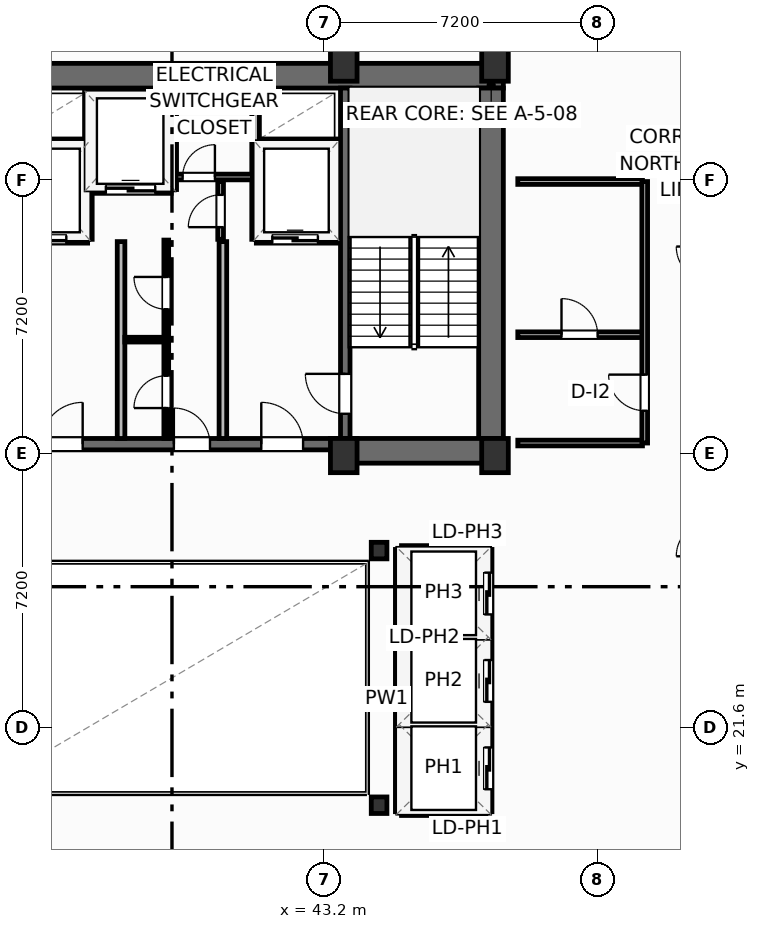
"""IFC4 building model, lengths in metres.
Left out: names, types, materials, properties, quantities, classifications, styles, units other than length and angle.
Written with IfcOpenShell. Run it as: python <this file> out.ifc"""

import sys

from ifc_helpers import new_model, si_unit, direction, frame, frame_2d, origin, origin_2d, place, context, subcontext, project, spatial, rectangle, i_section, extrude, element, fill, save


model = new_model("IFC4")
c1 = context("Model", 3, precision=1e-05, world=origin(), true_north=direction((0.0, 1.0)))
c2 = subcontext(c1, "Body", "Model", "MODEL_VIEW")
j1 = project(units=[si_unit("LENGTHUNIT", "METRE"), si_unit("PLANEANGLEUNIT", "RADIAN")], contexts=[c1])
p1 = place(None, origin())
s1 = spatial("IfcSite", under=j1, at=p1, CompositionType="ELEMENT")
p2 = place(p1, origin())
s2 = spatial("IfcBuilding", under=s1, at=p2, CompositionType="ELEMENT")
p3 = place(p2, frame((0.0, 0.0, 223.8)))
s3 = spatial("IfcBuildingStorey", under=s2, at=p3, CompositionType="ELEMENT", Elevation=223.8)
for number, where, z_axis, x_axis in (
    (1, (43.72, 28.75, 0.0), (0.0, 0.0, 1.0), (1.0, 0.0, 0.0)),
    (2, (47.7, 28.75, 0.0), (0.0, 0.0, 1.0), (1.0, 0.0, 0.0)),
    (3, (43.72, 39.05, 0.0), (0.0, 0.0, 1.0), (1.0, 0.0, 0.0)),
    (4, (47.7, 39.05, 0.0), (0.0, 0.0, 1.0), (1.0, 0.0, 0.0)),
):
    element("IfcColumn", number, at=place(p3, frame(where, z_axis=z_axis, x_axis=x_axis)), inside=s3, PredefinedType="COLUMN", context=c2, shape_type="SweptSolid", body=[
        extrude(rectangle(XDim=0.7, YDim=0.9, at=origin_2d()), origin(), (0.0, 0.0, 1.0), 3.7),
    ])
for number, where, z_axis, x_axis in (
    (5, (44.65, 19.55, 0.0), (0.0, 0.0, 1.0), (1.0, 0.0, 0.0)),
    (6, (44.65, 26.25, 0.0), (0.0, 0.0, 1.0), (1.0, 0.0, 0.0)),
):
    element("IfcColumn", number, at=place(p3, frame(where, z_axis=z_axis, x_axis=x_axis)), inside=s3, PredefinedType="COLUMN", context=c2, shape_type="SweptSolid", body=[
        extrude(i_section(OverallWidth=0.412, OverallDepth=0.435, WebThickness=0.036, FlangeThickness=0.057, FilletRadius=0.025, at=origin_2d()), origin(), (0.0, 0.0, 1.0), 3.7),
    ])
p4 = place(p3, frame((30.48, 38.745, 0.0), z_axis=(0.0, 0.0, 1.0), x_axis=(1.0, 0.0, 0.0)))
e7 = element("IfcWall", 7, at=p4, inside=s3, PredefinedType="SHEAR", context=c2, shape_type="SweptSolid", body=[
    extrude(rectangle(XDim=17.44, YDim=0.65, at=frame_2d((8.72, 0.0))), origin(), (0.0, 0.0, 1.0), 3.45),
])
p5 = place(p3, frame((47.595, 29.2, 0.0), z_axis=(0.0, 0.0, 1.0), x_axis=(0.0, 1.0, 0.0)))
e8 = element("IfcWall", 8, at=p5, inside=s3, PredefinedType="SHEAR", context=c2, shape_type="SweptSolid", body=[
    extrude(rectangle(XDim=9.22, YDim=0.65, at=frame_2d((4.61, 0.0))), origin(), (0.0, 0.0, 1.0), 3.45),
])
p6 = place(p3, frame((43.6, 28.875, 0.0), z_axis=(0.0, 0.0, 1.0), x_axis=(1.0, 0.0, 0.0)))
e9 = element("IfcWall", 9, at=p6, inside=s3, PredefinedType="SHEAR", context=c2, shape_type="SweptSolid", body=[
    extrude(rectangle(XDim=4.32, YDim=0.65, at=frame_2d((2.16, 0.0))), origin(), (0.0, 0.0, 1.0), 3.45),
])
p7 = place(p3, frame((34.8, 29.05, 0.0), z_axis=(0.0, 0.0, 1.0), x_axis=(1.0, 0.0, 0.0)))
e10 = element("IfcWall", 10, at=p7, inside=s3, PredefinedType="SHEAR", context=c2, shape_type="SweptSolid", body=[
    extrude(rectangle(XDim=8.8, YDim=0.3, at=frame_2d((4.4, 0.0))), origin(), (0.0, 0.0, 1.0), 3.45),
])
p8 = place(p7, frame((0.95, 0.0, 0.0)))
e11 = element("IfcOpeningElement", 11, at=p8, cuts=e10, PredefinedType="OPENING", context=c2, shape_type="SweptSolid", body=[
    extrude(rectangle(XDim=1.1, YDim=2.15, at=frame_2d((0.55, 1.075))), frame((0.0, 0.16, 0.0), z_axis=(0.0, -1.0, 0.0), x_axis=(1.0, 0.0, 0.0)), (0.0, 0.0, 1.0), 0.32),
])
p9 = place(p7, frame((6.75, 0.0, 0.0)))
e12 = element("IfcOpeningElement", 12, at=p9, cuts=e10, PredefinedType="OPENING", context=c2, shape_type="SweptSolid", body=[
    extrude(rectangle(XDim=1.1, YDim=2.15, at=frame_2d((0.55, 1.075))), frame((0.0, 0.16, 0.0), z_axis=(0.0, -1.0, 0.0), x_axis=(1.0, 0.0, 0.0)), (0.0, 0.0, 1.0), 0.32),
])
p10 = place(p7, frame((4.45, 0.0, 0.0)))
e13 = element("IfcOpeningElement", 13, at=p10, cuts=e10, PredefinedType="OPENING", context=c2, shape_type="SweptSolid", body=[
    extrude(rectangle(XDim=0.95, YDim=2.15, at=frame_2d((0.475, 1.075))), frame((0.0, 0.16, 0.0), z_axis=(0.0, -1.0, 0.0), x_axis=(1.0, 0.0, 0.0)), (0.0, 0.0, 1.0), 0.32),
])
p11 = place(p3, frame((43.76, 29.2, 0.0), z_axis=(0.0, 0.0, 1.0), x_axis=(0.0, 1.0, 0.0)))
e14 = element("IfcWall", 14, at=p11, inside=s3, PredefinedType="SHEAR", context=c2, shape_type="SweptSolid", body=[
    extrude(rectangle(XDim=9.22, YDim=0.25, at=frame_2d((4.61, 0.0))), origin(), (0.0, 0.0, 1.0), 3.45),
])
p12 = place(p11, frame((0.65, 0.0, 0.0)))
e15 = element("IfcOpeningElement", 15, at=p12, cuts=e14, PredefinedType="OPENING", context=c2, shape_type="SweptSolid", body=[
    extrude(rectangle(XDim=1.05, YDim=2.15, at=frame_2d((0.525, 1.075))), frame((0.0, 0.135, 0.0), z_axis=(0.0, -1.0, 0.0), x_axis=(1.0, 0.0, 0.0)), (0.0, 0.0, 1.0), 0.27),
])
for number, where, z_axis, x_axis in (
    (16, (37.86, 29.2, 0.0), (0.0, 0.0, 1.0), (0.0, 1.0, 0.0)),
    (17, (40.54, 29.2, 0.0), (0.0, 0.0, 1.0), (0.0, 1.0, 0.0)),
):
    element("IfcWall", number, at=place(p3, frame(where, z_axis=z_axis, x_axis=x_axis)), inside=s3, PredefinedType="PARTITIONING", context=c2, shape_type="SweptSolid", body=[
        extrude(rectangle(XDim=5.18, YDim=0.2, at=frame_2d((2.59, 0.0))), origin(), (0.0, 0.0, 1.0), 3.45),
    ])
p13 = place(p3, frame((34.8, 34.44, 0.0), z_axis=(0.0, 0.0, 1.0), x_axis=(1.0, 0.0, 0.0)))
e18 = element("IfcWall", 18, at=p13, inside=s3, PredefinedType="PARTITIONING", context=c2, shape_type="SweptSolid", body=[
    extrude(rectangle(XDim=2.18, YDim=0.2, at=frame_2d((1.09, 0.0))), origin(), (0.0, 0.0, 1.0), 3.45),
])
p14 = place(p13, frame((0.42, 0.0, 0.0)))
e19 = element("IfcOpeningElement", 19, at=p14, cuts=e18, PredefinedType="OPENING", context=c2, shape_type="SweptSolid", body=[
    extrude(rectangle(XDim=1.2, YDim=2.2, at=frame_2d((0.6, 1.1))), frame((0.0, 0.11, 0.0), z_axis=(0.0, -1.0, 0.0), x_axis=(1.0, 0.0, 0.0)), (0.0, 0.0, 1.0), 0.22),
])
p15 = place(p3, frame((34.8, 36.98, 0.0), z_axis=(0.0, 0.0, 1.0), x_axis=(1.0, 0.0, 0.0)))
e20 = element("IfcWall", 20, at=p15, inside=s3, PredefinedType="PARTITIONING", context=c2, shape_type="SweptSolid", body=[
    extrude(rectangle(XDim=2.18, YDim=0.2, at=frame_2d((1.09, 0.0))), origin(), (0.0, 0.0, 1.0), 3.45),
])
p16 = place(p3, frame((37.0, 34.44, 0.0), z_axis=(0.0, 0.0, 1.0), x_axis=(0.0, 1.0, 0.0)))
e21 = element("IfcWall", 21, at=p16, inside=s3, PredefinedType="PARTITIONING", context=c2, shape_type="SweptSolid", body=[
    extrude(rectangle(XDim=3.9, YDim=0.2, at=frame_2d((1.95, 0.0))), origin(), (0.0, 0.0, 1.0), 3.45),
])
p17 = place(p3, frame((41.42, 34.44, 0.0), z_axis=(0.0, 0.0, 1.0), x_axis=(1.0, 0.0, 0.0)))
e22 = element("IfcWall", 22, at=p17, inside=s3, PredefinedType="PARTITIONING", context=c2, shape_type="SweptSolid", body=[
    extrude(rectangle(XDim=2.18, YDim=0.2, at=frame_2d((1.09, 0.0))), origin(), (0.0, 0.0, 1.0), 3.45),
])
p18 = place(p17, frame((0.42, 0.0, 0.0)))
e23 = element("IfcOpeningElement", 23, at=p18, cuts=e22, PredefinedType="OPENING", context=c2, shape_type="SweptSolid", body=[
    extrude(rectangle(XDim=1.2, YDim=2.2, at=frame_2d((0.6, 1.1))), frame((0.0, 0.11, 0.0), z_axis=(0.0, -1.0, 0.0), x_axis=(1.0, 0.0, 0.0)), (0.0, 0.0, 1.0), 0.22),
])
p19 = place(p3, frame((41.42, 36.98, 0.0), z_axis=(0.0, 0.0, 1.0), x_axis=(1.0, 0.0, 0.0)))
e24 = element("IfcWall", 24, at=p19, inside=s3, PredefinedType="PARTITIONING", context=c2, shape_type="SweptSolid", body=[
    extrude(rectangle(XDim=2.18, YDim=0.2, at=frame_2d((1.09, 0.0))), origin(), (0.0, 0.0, 1.0), 3.45),
])
p20 = place(p3, frame((41.4, 34.44, 0.0), z_axis=(0.0, 0.0, 1.0), x_axis=(0.0, 1.0, 0.0)))
e25 = element("IfcWall", 25, at=p20, inside=s3, PredefinedType="PARTITIONING", context=c2, shape_type="SweptSolid", body=[
    extrude(rectangle(XDim=3.9, YDim=0.2, at=frame_2d((1.95, 0.0))), origin(), (0.0, 0.0, 1.0), 3.45),
])
p21 = place(p3, frame((37.06, 35.75, 0.0), z_axis=(0.0, 0.0, 1.0), x_axis=(1.0, 0.0, 0.0)))
e26 = element("IfcWall", 26, at=p21, inside=s3, PredefinedType="PARTITIONING", context=c2, shape_type="SweptSolid", body=[
    extrude(rectangle(XDim=2.12, YDim=0.2, at=frame_2d((1.06, 0.0))), origin(), (0.0, 0.0, 1.0), 3.45),
])
p22 = place(p21, frame((0.4, 0.0, 0.0)))
e27 = element("IfcOpeningElement", 27, at=p22, cuts=e26, PredefinedType="OPENING", context=c2, shape_type="SweptSolid", body=[
    extrude(rectangle(XDim=1.3, YDim=2.2, at=frame_2d((0.65, 1.1))), frame((0.0, 0.11, 0.0), z_axis=(0.0, -1.0, 0.0), x_axis=(1.0, 0.0, 0.0)), (0.0, 0.0, 1.0), 0.22),
])
p23 = place(p3, frame((39.22, 35.75, 0.0), z_axis=(0.0, 0.0, 1.0), x_axis=(0.0, 1.0, 0.0)))
e28 = element("IfcWall", 28, at=p23, inside=s3, PredefinedType="PARTITIONING", context=c2, shape_type="SweptSolid", body=[
    extrude(rectangle(XDim=2.59, YDim=0.2, at=frame_2d((1.295, 0.0))), origin(), (0.0, 0.0, 1.0), 3.45),
])
p24 = place(p3, frame((39.3, 36.08, 0.0), z_axis=(0.0, 0.0, 1.0), x_axis=(1.0, 0.0, 0.0)))
e29 = element("IfcWall", 29, at=p24, inside=s3, PredefinedType="PARTITIONING", context=c2, shape_type="SweptSolid", body=[
    extrude(rectangle(XDim=2.02, YDim=0.15, at=frame_2d((1.01, 0.0))), origin(), (0.0, 0.0, 1.0), 3.45),
])
p25 = place(p24, frame((0.18, 0.0, 0.0)))
e30 = element("IfcOpeningElement", 30, at=p25, cuts=e29, PredefinedType="OPENING", context=c2, shape_type="SweptSolid", body=[
    extrude(rectangle(XDim=0.85, YDim=2.05, at=frame_2d((0.425, 1.025))), frame((0.0, 0.085, 0.0), z_axis=(0.0, -1.0, 0.0), x_axis=(1.0, 0.0, 0.0)), (0.0, 0.0, 1.0), 0.17),
])
p26 = place(p3, frame((40.48, 34.44, 0.0), z_axis=(0.0, 0.0, 1.0), x_axis=(0.0, 1.0, 0.0)))
e31 = element("IfcWall", 31, at=p26, inside=s3, PredefinedType="PARTITIONING", context=c2, shape_type="SweptSolid", body=[
    extrude(rectangle(XDim=1.52, YDim=0.15, at=frame_2d((0.76, 0.0))), origin(), (0.0, 0.0, 1.0), 3.45),
])
p27 = place(p26, frame((0.32, 0.0, 0.0)))
e32 = element("IfcOpeningElement", 32, at=p27, cuts=e31, PredefinedType="OPENING", context=c2, shape_type="SweptSolid", body=[
    extrude(rectangle(XDim=0.85, YDim=2.05, at=frame_2d((0.425, 1.025))), frame((0.0, 0.085, 0.0), z_axis=(0.0, -1.0, 0.0), x_axis=(1.0, 0.0, 0.0)), (0.0, 0.0, 1.0), 0.17),
])
p28 = place(p3, frame((37.96, 31.8, 0.0), z_axis=(0.0, 0.0, 1.0), x_axis=(1.0, 0.0, 0.0)))
e33 = element("IfcWall", 33, at=p28, inside=s3, PredefinedType="PARTITIONING", context=c2, shape_type="SweptSolid", body=[
    extrude(rectangle(XDim=1.09, YDim=0.125, at=frame_2d((0.545, 0.0))), origin(), (0.0, 0.0, 1.0), 3.45),
])
p29 = place(p3, frame((39.05, 29.2, 0.0), z_axis=(0.0, 0.0, 1.0), x_axis=(0.0, 1.0, 0.0)))
e34 = element("IfcWall", 34, at=p29, inside=s3, PredefinedType="PARTITIONING", context=c2, shape_type="SweptSolid", body=[
    extrude(rectangle(XDim=5.22, YDim=0.125, at=frame_2d((2.61, 0.0))), origin(), (0.0, 0.0, 1.0), 3.45),
])
p30 = place(p29, frame((0.8, 0.0, 0.0)))
e35 = element("IfcOpeningElement", 35, at=p30, cuts=e34, PredefinedType="OPENING", context=c2, shape_type="SweptSolid", body=[
    extrude(rectangle(XDim=0.85, YDim=2.05, at=frame_2d((0.425, 1.025))), frame((0.0, 0.073, 0.0), z_axis=(0.0, -1.0, 0.0), x_axis=(1.0, 0.0, 0.0)), (0.0, 0.0, 1.0), 0.145),
])
p31 = place(p29, frame((3.4, 0.0, 0.0)))
e36 = element("IfcOpeningElement", 36, at=p31, cuts=e34, PredefinedType="OPENING", context=c2, shape_type="SweptSolid", body=[
    extrude(rectangle(XDim=0.85, YDim=2.05, at=frame_2d((0.425, 1.025))), frame((0.0, 0.073, 0.0), z_axis=(0.0, -1.0, 0.0), x_axis=(1.0, 0.0, 0.0)), (0.0, 0.0, 1.0), 0.145),
])
p32 = place(p3, frame((48.3, 31.93, 0.0), z_axis=(0.0, 0.0, 1.0), x_axis=(1.0, 0.0, 0.0)))
e37 = element("IfcWall", 37, at=p32, inside=s3, PredefinedType="PARTITIONING", context=c2, shape_type="SweptSolid", body=[
    extrude(rectangle(XDim=3.28, YDim=0.15, at=frame_2d((1.64, 0.0))), origin(), (0.0, 0.0, 1.0), 3.45),
])
p33 = place(p32, frame((1.15, 0.0, 0.0)))
e38 = element("IfcOpeningElement", 38, at=p33, cuts=e37, PredefinedType="OPENING", context=c2, shape_type="SweptSolid", body=[
    extrude(rectangle(XDim=0.95, YDim=2.05, at=frame_2d((0.475, 1.025))), frame((0.0, 0.085, 0.0), z_axis=(0.0, -1.0, 0.0), x_axis=(1.0, 0.0, 0.0)), (0.0, 0.0, 1.0), 0.17),
])
p34 = place(p3, frame((48.3, 29.08, 0.0), z_axis=(0.0, 0.0, 1.0), x_axis=(1.0, 0.0, 0.0)))
e39 = element("IfcWall", 39, at=p34, inside=s3, PredefinedType="PARTITIONING", context=c2, shape_type="SweptSolid", body=[
    extrude(rectangle(XDim=3.28, YDim=0.15, at=frame_2d((1.64, 0.0))), origin(), (0.0, 0.0, 1.0), 2.662),
])
p35 = place(p3, frame((48.3, 35.96, 0.0), z_axis=(0.0, 0.0, 1.0), x_axis=(1.0, 0.0, 0.0)))
e40 = element("IfcWall", 40, at=p35, inside=s3, PredefinedType="PARTITIONING", context=c2, shape_type="SweptSolid", body=[
    extrude(rectangle(XDim=3.28, YDim=0.15, at=frame_2d((1.64, 0.0))), origin(), (0.0, 0.0, 1.0), 3.45),
])
p36 = place(p3, frame((51.64, 29.08, 0.0), z_axis=(0.0, 0.0, 1.0), x_axis=(0.0, 1.0, 0.0)))
e41 = element("IfcWall", 41, at=p36, inside=s3, PredefinedType="PARTITIONING", context=c2, shape_type="SweptSolid", body=[
    extrude(rectangle(XDim=6.88, YDim=0.15, at=frame_2d((3.44, 0.0))), origin(), (0.0, 0.0, 1.0), 3.45),
])
p37 = place(p36, frame((0.85, 0.0, 0.0)))
e42 = element("IfcOpeningElement", 42, at=p37, cuts=e41, PredefinedType="OPENING", context=c2, shape_type="SweptSolid", body=[
    extrude(rectangle(XDim=0.95, YDim=2.05, at=frame_2d((0.475, 1.025))), frame((0.0, 0.085, 0.0), z_axis=(0.0, -1.0, 0.0), x_axis=(1.0, 0.0, 0.0)), (0.0, 0.0, 1.0), 0.17),
])
for number, where, z_axis, x_axis in (
    (43, (45.24, 21.675, 0.0), (0.0, 0.0, 1.0), (1.0, 0.0, 0.0)),
    (44, (45.24, 23.975, 0.0), (0.0, 0.0, 1.0), (1.0, 0.0, 0.0)),
):
    element("IfcWall", number, at=place(p3, frame(where, z_axis=z_axis, x_axis=x_axis)), inside=s3, PredefinedType="PARTITIONING", context=c2, shape_type="SweptSolid", body=[
        extrude(rectangle(XDim=2.22, YDim=0.2, at=frame_2d((1.11, 0.0))), origin(), (0.0, 0.0, 1.0), 3.45),
    ])
p38 = place(p3, frame((45.24, 19.38, 0.0), z_axis=(0.0, 0.0, 1.0), x_axis=(1.0, 0.0, 0.0)))
e45 = element("IfcWall", 45, at=p38, inside=s3, PredefinedType="PARTITIONING", context=c2, shape_type="SweptSolid", body=[
    extrude(rectangle(XDim=2.22, YDim=0.2, at=frame_2d((1.11, 0.0))), origin(), (0.0, 0.0, 1.0), 2.662),
])
p39 = place(p3, frame((45.24, 26.28, 0.0), z_axis=(0.0, 0.0, 1.0), x_axis=(1.0, 0.0, 0.0)))
e46 = element("IfcWall", 46, at=p39, inside=s3, PredefinedType="PARTITIONING", context=c2, shape_type="SweptSolid", body=[
    extrude(rectangle(XDim=2.22, YDim=0.2, at=frame_2d((1.11, 0.0))), origin(), (0.0, 0.0, 1.0), 3.45),
])
p40 = place(p3, frame((45.18, 19.38, 0.0), z_axis=(0.0, 0.0, 1.0), x_axis=(0.0, 1.0, 0.0)))
e47 = element("IfcWall", 47, at=p40, inside=s3, PredefinedType="PARTITIONING", context=c2, shape_type="SweptSolid", body=[
    extrude(rectangle(XDim=6.9, YDim=0.2, at=frame_2d((3.45, 0.0))), origin(), (0.0, 0.0, 1.0), 3.45),
])
p41 = place(p3, frame((47.52, 19.38, 0.0), z_axis=(0.0, 0.0, 1.0), x_axis=(0.0, 1.0, 0.0)))
e48 = element("IfcWall", 48, at=p41, inside=s3, PredefinedType="PARTITIONING", context=c2, shape_type="SweptSolid", body=[
    extrude(rectangle(XDim=6.9, YDim=0.2, at=frame_2d((3.45, 0.0))), origin(), (0.0, 0.0, 1.0), 3.45),
])
p42 = place(p41, frame((0.59, 0.0, 0.0)))
e49 = element("IfcOpeningElement", 49, at=p42, cuts=e48, PredefinedType="OPENING", context=c2, shape_type="SweptSolid", body=[
    extrude(rectangle(XDim=1.1, YDim=2.15, at=frame_2d((0.55, 1.075))), frame((0.0, 0.11, 0.0), z_axis=(0.0, -1.0, 0.0), x_axis=(1.0, 0.0, 0.0)), (0.0, 0.0, 1.0), 0.22),
])
p43 = place(p41, frame((2.89, 0.0, 0.0)))
e50 = element("IfcOpeningElement", 50, at=p43, cuts=e48, PredefinedType="OPENING", context=c2, shape_type="SweptSolid", body=[
    extrude(rectangle(XDim=1.1, YDim=2.15, at=frame_2d((0.55, 1.075))), frame((0.0, 0.11, 0.0), z_axis=(0.0, -1.0, 0.0), x_axis=(1.0, 0.0, 0.0)), (0.0, 0.0, 1.0), 0.22),
])
p44 = place(p41, frame((5.19, 0.0, 0.0)))
e51 = element("IfcOpeningElement", 51, at=p44, cuts=e48, PredefinedType="OPENING", context=c2, shape_type="SweptSolid", body=[
    extrude(rectangle(XDim=1.1, YDim=2.15, at=frame_2d((0.55, 1.075))), frame((0.0, 0.11, 0.0), z_axis=(0.0, -1.0, 0.0), x_axis=(1.0, 0.0, 0.0)), (0.0, 0.0, 1.0), 0.22),
])
p45 = place(p12, origin())
e52 = element("IfcDoor", 52, at=p45, inside=s3, OperationType="SINGLE_SWING_RIGHT", PredefinedType="DOOR", context=c2, shape_type="SweptSolid", body=[
    extrude(rectangle(XDim=1.05, YDim=2.15, at=frame_2d((0.525, 1.075))), frame((0.0, 0.025, 0.0), z_axis=(0.0, -1.0, 0.0), x_axis=(1.0, 0.0, 0.0)), (0.0, 0.0, 1.0), 0.05),
])
fill(e15, e52)
p46 = place(p8, origin())
e53 = element("IfcDoor", 53, at=p46, inside=s3, OperationType="SINGLE_SWING_RIGHT", PredefinedType="DOOR", context=c2, shape_type="SweptSolid", body=[
    extrude(rectangle(XDim=1.1, YDim=2.15, at=frame_2d((0.55, 1.075))), frame((0.0, 0.025, 0.0), z_axis=(0.0, -1.0, 0.0), x_axis=(1.0, 0.0, 0.0)), (0.0, 0.0, 1.0), 0.05),
])
fill(e11, e53)
p47 = place(p9, origin())
e54 = element("IfcDoor", 54, at=p47, inside=s3, OperationType="SINGLE_SWING_LEFT", PredefinedType="DOOR", context=c2, shape_type="SweptSolid", body=[
    extrude(rectangle(XDim=1.1, YDim=2.15, at=frame_2d((0.55, 1.075))), frame((0.0, 0.025, 0.0), z_axis=(0.0, -1.0, 0.0), x_axis=(1.0, 0.0, 0.0)), (0.0, 0.0, 1.0), 0.05),
])
fill(e12, e54)
p48 = place(p14, origin())
e55 = element("IfcDoor", 55, at=p48, inside=s3, OperationType="SLIDING_TO_LEFT", PredefinedType="DOOR", context=c2, shape_type="SweptSolid", body=[
    extrude(rectangle(XDim=1.2, YDim=2.2, at=frame_2d((0.6, 1.1))), frame((0.0, 0.025, 0.0), z_axis=(0.0, -1.0, 0.0), x_axis=(1.0, 0.0, 0.0)), (0.0, 0.0, 1.0), 0.05),
])
fill(e19, e55)
p49 = place(p18, origin())
e56 = element("IfcDoor", 56, at=p49, inside=s3, OperationType="SLIDING_TO_LEFT", PredefinedType="DOOR", context=c2, shape_type="SweptSolid", body=[
    extrude(rectangle(XDim=1.2, YDim=2.2, at=frame_2d((0.6, 1.1))), frame((0.0, 0.025, 0.0), z_axis=(0.0, -1.0, 0.0), x_axis=(1.0, 0.0, 0.0)), (0.0, 0.0, 1.0), 0.05),
])
fill(e23, e56)
p50 = place(p22, origin())
e57 = element("IfcDoor", 57, at=p50, inside=s3, OperationType="SLIDING_TO_LEFT", PredefinedType="DOOR", context=c2, shape_type="SweptSolid", body=[
    extrude(rectangle(XDim=1.3, YDim=2.2, at=frame_2d((0.65, 1.1))), frame((0.0, 0.025, 0.0), z_axis=(0.0, -1.0, 0.0), x_axis=(1.0, 0.0, 0.0)), (0.0, 0.0, 1.0), 0.05),
])
fill(e27, e57)
p51 = place(p25, origin())
e58 = element("IfcDoor", 58, at=p51, inside=s3, OperationType="SINGLE_SWING_RIGHT", PredefinedType="DOOR", context=c2, shape_type="SweptSolid", body=[
    extrude(rectangle(XDim=0.85, YDim=2.05, at=frame_2d((0.425, 1.025))), frame((0.0, 0.025, 0.0), z_axis=(0.0, -1.0, 0.0), x_axis=(1.0, 0.0, 0.0)), (0.0, 0.0, 1.0), 0.05),
])
fill(e30, e58)
p52 = place(p27, origin())
e59 = element("IfcDoor", 59, at=p52, inside=s3, OperationType="SINGLE_SWING_LEFT", PredefinedType="DOOR", context=c2, shape_type="SweptSolid", body=[
    extrude(rectangle(XDim=0.85, YDim=2.05, at=frame_2d((0.425, 1.025))), frame((0.0, 0.025, 0.0), z_axis=(0.0, -1.0, 0.0), x_axis=(1.0, 0.0, 0.0)), (0.0, 0.0, 1.0), 0.05),
])
fill(e32, e59)
p53 = place(p30, origin())
e60 = element("IfcDoor", 60, at=p53, inside=s3, OperationType="SINGLE_SWING_LEFT", PredefinedType="DOOR", context=c2, shape_type="SweptSolid", body=[
    extrude(rectangle(XDim=0.85, YDim=2.05, at=frame_2d((0.425, 1.025))), frame((0.0, 0.025, 0.0), z_axis=(0.0, -1.0, 0.0), x_axis=(1.0, 0.0, 0.0)), (0.0, 0.0, 1.0), 0.05),
])
fill(e35, e60)
p54 = place(p31, origin())
e61 = element("IfcDoor", 61, at=p54, inside=s3, OperationType="SINGLE_SWING_RIGHT", PredefinedType="DOOR", context=c2, shape_type="SweptSolid", body=[
    extrude(rectangle(XDim=0.85, YDim=2.05, at=frame_2d((0.425, 1.025))), frame((0.0, 0.025, 0.0), z_axis=(0.0, -1.0, 0.0), x_axis=(1.0, 0.0, 0.0)), (0.0, 0.0, 1.0), 0.05),
])
fill(e36, e61)
p55 = place(p10, origin())
e62 = element("IfcDoor", 62, at=p55, inside=s3, OperationType="SINGLE_SWING_LEFT", PredefinedType="DOOR", context=c2, shape_type="SweptSolid", body=[
    extrude(rectangle(XDim=0.95, YDim=2.15, at=frame_2d((0.475, 1.075))), frame((0.0, 0.025, 0.0), z_axis=(0.0, -1.0, 0.0), x_axis=(1.0, 0.0, 0.0)), (0.0, 0.0, 1.0), 0.05),
])
fill(e13, e62)
p56 = place(p33, origin())
e63 = element("IfcDoor", 63, at=p56, inside=s3, OperationType="SINGLE_SWING_LEFT", PredefinedType="DOOR", context=c2, shape_type="SweptSolid", body=[
    extrude(rectangle(XDim=0.95, YDim=2.05, at=frame_2d((0.475, 1.025))), frame((0.0, 0.025, 0.0), z_axis=(0.0, -1.0, 0.0), x_axis=(1.0, 0.0, 0.0)), (0.0, 0.0, 1.0), 0.05),
])
fill(e38, e63)
p57 = place(p37, origin())
e64 = element("IfcDoor", 64, at=p57, inside=s3, OperationType="SINGLE_SWING_RIGHT", PredefinedType="DOOR", context=c2, shape_type="SweptSolid", body=[
    extrude(rectangle(XDim=0.95, YDim=2.05, at=frame_2d((0.475, 1.025))), frame((0.0, 0.025, 0.0), z_axis=(0.0, -1.0, 0.0), x_axis=(1.0, 0.0, 0.0)), (0.0, 0.0, 1.0), 0.05),
])
fill(e42, e64)
p58 = place(p42, origin())
e65 = element("IfcDoor", 65, at=p58, inside=s3, OperationType="SLIDING_TO_LEFT", PredefinedType="DOOR", context=c2, shape_type="SweptSolid", body=[
    extrude(rectangle(XDim=1.1, YDim=2.15, at=frame_2d((0.55, 1.075))), frame((0.0, 0.025, 0.0), z_axis=(0.0, -1.0, 0.0), x_axis=(1.0, 0.0, 0.0)), (0.0, 0.0, 1.0), 0.05),
])
fill(e49, e65)
p59 = place(p43, origin())
e66 = element("IfcDoor", 66, at=p59, inside=s3, OperationType="SLIDING_TO_LEFT", PredefinedType="DOOR", context=c2, shape_type="SweptSolid", body=[
    extrude(rectangle(XDim=1.1, YDim=2.15, at=frame_2d((0.55, 1.075))), frame((0.0, 0.025, 0.0), z_axis=(0.0, -1.0, 0.0), x_axis=(1.0, 0.0, 0.0)), (0.0, 0.0, 1.0), 0.05),
])
fill(e50, e66)
p60 = place(p44, origin())
e67 = element("IfcDoor", 67, at=p60, inside=s3, OperationType="SLIDING_TO_LEFT", PredefinedType="DOOR", context=c2, shape_type="SweptSolid", body=[
    extrude(rectangle(XDim=1.1, YDim=2.15, at=frame_2d((0.55, 1.075))), frame((0.0, 0.025, 0.0), z_axis=(0.0, -1.0, 0.0), x_axis=(1.0, 0.0, 0.0)), (0.0, 0.0, 1.0), 0.05),
])
fill(e51, e67)
save(model, sys.argv[1])
